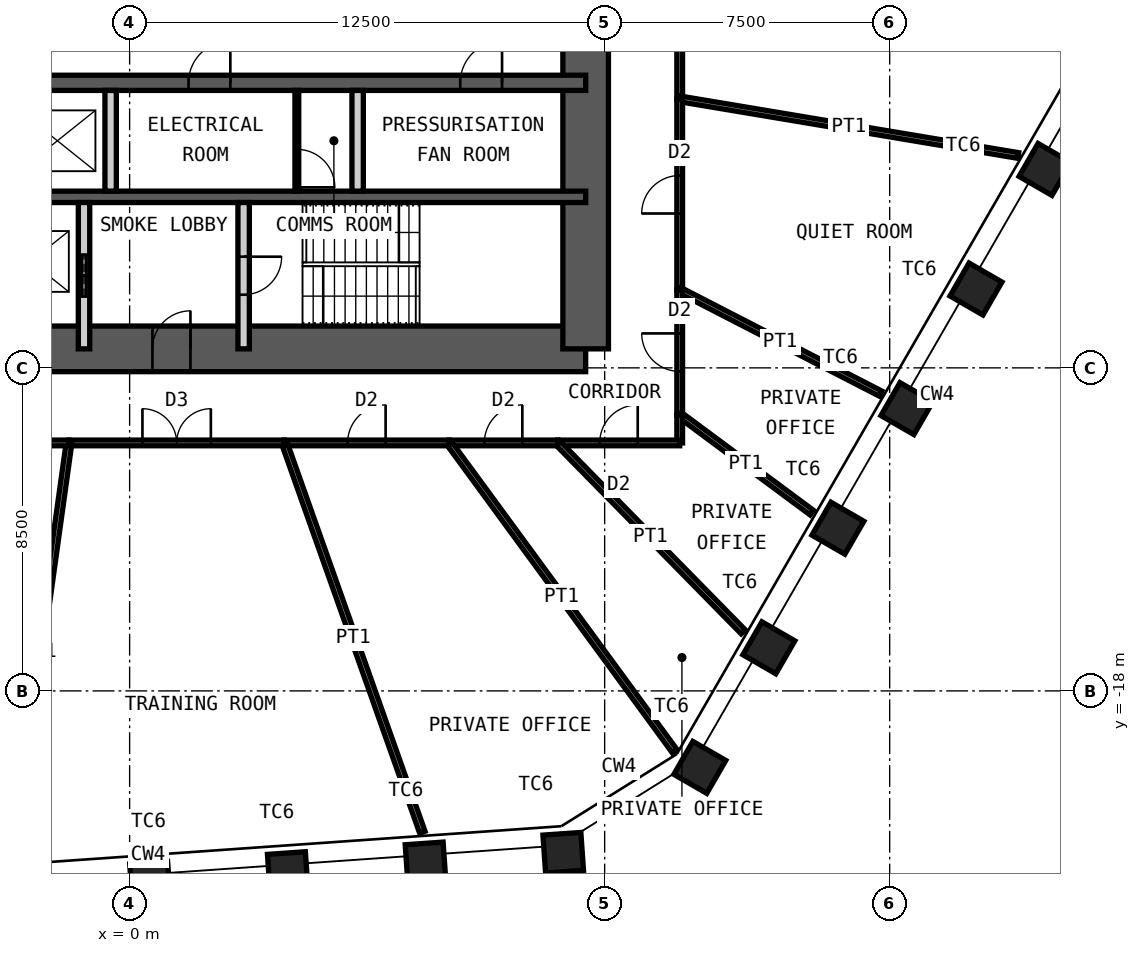
"""IFC4 building model, lengths in metres.
Left out: names, types, materials, properties, quantities, classifications, styles, units other than length and angle.
Written with IfcOpenShell. Run it as: python <this file> out.ifc"""

import sys

from ifc_helpers import new_model, si_unit, direction, frame, frame_2d, origin, origin_2d, place, context, subcontext, project, spatial, rectangle, hollow_rectangle, extrude, element, fill, save


model = new_model("IFC4")
c1 = context("Model", 3, precision=1e-05, world=origin(), true_north=direction((0.0, 1.0)))
c2 = subcontext(c1, "Body", "Model", "MODEL_VIEW")
j1 = project(units=[si_unit("LENGTHUNIT", "METRE"), si_unit("PLANEANGLEUNIT", "RADIAN")], contexts=[c1])
p1 = place(None, origin())
s1 = spatial("IfcSite", under=j1, at=p1, CompositionType="ELEMENT")
p2 = place(p1, origin())
s2 = spatial("IfcBuilding", under=s1, at=p2, CompositionType="ELEMENT")
p3 = place(p2, frame((0.0, 0.0, 235.0)))
s3 = spatial("IfcBuildingStorey", under=s2, at=p3, CompositionType="ELEMENT", Elevation=235.0)
for number, where, z_axis, x_axis in (
    (1, (24.088, -4.279, 0.0), (0.0, 0.0, 1.0), (0.5, 0.866, 0.0)),
    (2, (22.271, -7.426, 0.0), (0.0, 0.0, 1.0), (0.5, 0.866, 0.0)),
    (3, (20.454, -10.572, 0.0), (0.0, 0.0, 1.0), (0.5, 0.866, 0.0)),
    (4, (18.637, -13.719, 0.0), (0.0, 0.0, 1.0), (0.5, 0.866, 0.0)),
    (5, (16.821, -16.866, 0.0), (0.0, 0.0, 1.0), (0.5, 0.866, 0.0)),
    (6, (15.004, -20.012, 0.0), (0.0, 0.0, 1.0), (0.5, 0.866, 0.0)),
    (7, (11.41, -22.258, 0.0), (0.0, 0.0, 1.0), (0.998, 0.07, 0.0)),
    (8, (7.785, -22.512, 0.0), (0.0, 0.0, 1.0), (0.998, 0.07, 0.0)),
    (9, (4.16, -22.765, 0.0), (0.0, 0.0, 1.0), (0.998, 0.07, 0.0)),
    (10, (0.536, -23.019, 0.0), (0.0, 0.0, 1.0), (0.998, 0.07, 0.0)),
):
    element("IfcColumn", number, at=place(p3, frame(where, z_axis=z_axis, x_axis=x_axis)), inside=s3, PredefinedType="COLUMN", context=c2, shape_type="SweptSolid", body=[
        extrude(hollow_rectangle(XDim=1.0, YDim=1.0, WallThickness=0.06, at=origin_2d()), origin(), (0.0, 0.0, 1.0), 4.2),
    ])
p4 = place(p3, frame((-12.0, -9.0, 0.0), z_axis=(0.0, 0.0, 1.0), x_axis=(1.0, 0.0, 0.0)))
e11 = element("IfcWall", 11, at=p4, inside=s3, PredefinedType="SHEAR", context=c2, shape_type="SweptSolid", body=[
    extrude(rectangle(XDim=24.0, YDim=1.2, at=frame_2d((12.0, 0.0))), origin(), (0.0, 0.0, 1.0), 4.2),
])
p5 = place(p4, frame((1.35, 0.0, 0.0)))
e12 = element("IfcOpeningElement", 12, at=p5, cuts=e11, PredefinedType="OPENING", context=c2, shape_type="SweptSolid", body=[
    extrude(rectangle(XDim=1.0, YDim=2.1, at=frame_2d((0.5, 1.05))), frame((0.0, 0.61, 0.0), z_axis=(0.0, -1.0, 0.0), x_axis=(1.0, 0.0, 0.0)), (0.0, 0.0, 1.0), 1.22),
])
p6 = place(p4, frame((5.325, 0.0, 0.0)))
e13 = element("IfcOpeningElement", 13, at=p6, cuts=e11, PredefinedType="OPENING", context=c2, shape_type="SweptSolid", body=[
    extrude(rectangle(XDim=1.15, YDim=2.1, at=frame_2d((0.575, 1.05))), frame((0.0, 0.61, 0.0), z_axis=(0.0, -1.0, 0.0), x_axis=(1.0, 0.0, 0.0)), (0.0, 0.0, 1.0), 1.22),
])
p7 = place(p4, frame((12.6, 0.0, 0.0)))
e14 = element("IfcOpeningElement", 14, at=p7, cuts=e11, PredefinedType="OPENING", context=c2, shape_type="SweptSolid", body=[
    extrude(rectangle(XDim=1.0, YDim=2.1, at=frame_2d((0.5, 1.05))), frame((0.0, 0.61, 0.0), z_axis=(0.0, -1.0, 0.0), x_axis=(1.0, 0.0, 0.0)), (0.0, 0.0, 1.0), 1.22),
])
p8 = place(p3, frame((12.0, -9.0, 0.0), z_axis=(0.0, 0.0, 1.0), x_axis=(0.0, 1.0, 0.0)))
e15 = element("IfcWall", 15, at=p8, inside=s3, PredefinedType="SHEAR", context=c2, shape_type="SweptSolid", body=[
    extrude(rectangle(XDim=18.0, YDim=1.2, at=frame_2d((9.0, 0.0))), origin(), (0.0, 0.0, 1.0), 4.2),
])
p9 = place(p8, frame((8.1, 0.0, 0.0)))
e16 = element("IfcOpeningElement", 16, at=p9, cuts=e15, PredefinedType="OPENING", context=c2, shape_type="SweptSolid", body=[
    extrude(rectangle(XDim=1.8, YDim=2.1, at=frame_2d((0.9, 1.05))), frame((0.0, 0.61, 0.0), z_axis=(0.0, -1.0, 0.0), x_axis=(1.0, 0.0, 0.0)), (0.0, 0.0, 1.0), 1.22),
])
p10 = place(p3, frame((-12.0, -2.0, 0.0), z_axis=(0.0, 0.0, 1.0), x_axis=(1.0, 0.0, 0.0)))
e17 = element("IfcWall", 17, at=p10, inside=s3, PredefinedType="SHEAR", context=c2, shape_type="SweptSolid", body=[
    extrude(rectangle(XDim=24.0, YDim=0.4, at=frame_2d((12.0, 0.0))), origin(), (0.0, 0.0, 1.0), 4.2),
])
p11 = place(p10, frame((1.1, 0.0, 0.0)))
e18 = element("IfcOpeningElement", 18, at=p11, cuts=e17, PredefinedType="OPENING", context=c2, shape_type="SweptSolid", body=[
    extrude(rectangle(XDim=1.1, YDim=2.1, at=frame_2d((0.55, 1.05))), frame((0.0, 0.21, 0.0), z_axis=(0.0, -1.0, 0.0), x_axis=(1.0, 0.0, 0.0)), (0.0, 0.0, 1.0), 0.42),
])
p12 = place(p10, frame((13.55, 0.0, 0.0)))
e19 = element("IfcOpeningElement", 19, at=p12, cuts=e17, PredefinedType="OPENING", context=c2, shape_type="SweptSolid", body=[
    extrude(rectangle(XDim=1.1, YDim=2.1, at=frame_2d((0.55, 1.05))), frame((0.0, 0.21, 0.0), z_axis=(0.0, -1.0, 0.0), x_axis=(1.0, 0.0, 0.0)), (0.0, 0.0, 1.0), 0.42),
])
p13 = place(p10, frame((20.7, 0.0, 0.0)))
e20 = element("IfcOpeningElement", 20, at=p13, cuts=e17, PredefinedType="OPENING", context=c2, shape_type="SweptSolid", body=[
    extrude(rectangle(XDim=1.1, YDim=2.1, at=frame_2d((0.55, 1.05))), frame((0.0, 0.21, 0.0), z_axis=(0.0, -1.0, 0.0), x_axis=(1.0, 0.0, 0.0)), (0.0, 0.0, 1.0), 0.42),
])
p14 = place(p10, frame((4.0, 0.0, 0.0)))
e21 = element("IfcOpeningElement", 21, at=p14, cuts=e17, PredefinedType="OPENING", context=c2, shape_type="SweptSolid", body=[
    extrude(rectangle(XDim=1.0, YDim=2.1, at=frame_2d((0.5, 1.05))), frame((0.0, 0.21, 0.0), z_axis=(0.0, -1.0, 0.0), x_axis=(1.0, 0.0, 0.0)), (0.0, 0.0, 1.0), 0.42),
])
p15 = place(p10, frame((6.8, 0.0, 0.0)))
e22 = element("IfcOpeningElement", 22, at=p15, cuts=e17, PredefinedType="OPENING", context=c2, shape_type="SweptSolid", body=[
    extrude(rectangle(XDim=1.0, YDim=2.1, at=frame_2d((0.5, 1.05))), frame((0.0, 0.21, 0.0), z_axis=(0.0, -1.0, 0.0), x_axis=(1.0, 0.0, 0.0)), (0.0, 0.0, 1.0), 0.42),
])
p16 = place(p3, frame((-12.0, -5.0, 0.0), z_axis=(0.0, 0.0, 1.0), x_axis=(1.0, 0.0, 0.0)))
e23 = element("IfcWall", 23, at=p16, inside=s3, PredefinedType="SHEAR", context=c2, shape_type="SweptSolid", body=[
    extrude(rectangle(XDim=24.0, YDim=0.3, at=frame_2d((12.0, 0.0))), origin(), (0.0, 0.0, 1.0), 4.2),
])
for number, where, z_axis, x_axis in (
    (24, (-0.5, -4.85, 0.0), (0.0, 0.0, 1.0), (0.0, 1.0, 0.0)),
    (25, (6.0, -4.85, 0.0), (0.0, 0.0, 1.0), (0.0, 1.0, 0.0)),
):
    element("IfcWall", number, at=place(p3, frame(where, z_axis=z_axis, x_axis=x_axis)), inside=s3, PredefinedType="PARTITIONING", context=c2, shape_type="SweptSolid", body=[
        extrude(rectangle(XDim=2.65, YDim=0.3, at=frame_2d((1.325, 0.0))), origin(), (0.0, 0.0, 1.0), 3.98),
    ])
p17 = place(p3, frame((-1.2, -9.0, 0.0), z_axis=(0.0, 0.0, 1.0), x_axis=(0.0, 1.0, 0.0)))
e26 = element("IfcWall", 26, at=p17, inside=s3, PredefinedType="PARTITIONING", context=c2, shape_type="SweptSolid", body=[
    extrude(rectangle(XDim=3.85, YDim=0.3, at=frame_2d((1.925, 0.0))), origin(), (0.0, 0.0, 1.0), 3.98),
])
p18 = place(p17, frame((1.375, 0.0, 0.0)))
e27 = element("IfcOpeningElement", 27, at=p18, cuts=e26, PredefinedType="OPENING", context=c2, shape_type="SweptSolid", body=[
    extrude(rectangle(XDim=1.1, YDim=2.4, at=frame_2d((0.55, 1.2))), frame((0.0, 0.16, 0.0), z_axis=(0.0, -1.0, 0.0), x_axis=(1.0, 0.0, 0.0)), (0.0, 0.0, 1.0), 0.32),
])
p19 = place(p3, frame((3.0, -9.0, 0.0), z_axis=(0.0, 0.0, 1.0), x_axis=(0.0, 1.0, 0.0)))
e28 = element("IfcWall", 28, at=p19, inside=s3, PredefinedType="PARTITIONING", context=c2, shape_type="SweptSolid", body=[
    extrude(rectangle(XDim=3.85, YDim=0.3, at=frame_2d((1.925, 0.0))), origin(), (0.0, 0.0, 1.0), 3.98),
])
p20 = place(p19, frame((1.425, 0.0, 0.0)))
e29 = element("IfcOpeningElement", 29, at=p20, cuts=e28, PredefinedType="OPENING", context=c2, shape_type="SweptSolid", body=[
    extrude(rectangle(XDim=1.0, YDim=2.1, at=frame_2d((0.5, 1.05))), frame((0.0, 0.16, 0.0), z_axis=(0.0, -1.0, 0.0), x_axis=(1.0, 0.0, 0.0)), (0.0, 0.0, 1.0), 0.32),
])
p21 = place(p3, frame((4.4, -4.85, 0.0), z_axis=(0.0, 0.0, 1.0), x_axis=(0.0, 1.0, 0.0)))
e30 = element("IfcWall", 30, at=p21, inside=s3, PredefinedType="PARTITIONING", context=c2, shape_type="SweptSolid", body=[
    extrude(rectangle(XDim=2.65, YDim=0.1, at=frame_2d((1.325, 0.0))), origin(), (0.0, 0.0, 1.0), 3.98),
])
p22 = place(p21, frame((0.1, 0.0, 0.0)))
e31 = element("IfcOpeningElement", 31, at=p22, cuts=e30, PredefinedType="OPENING", context=c2, shape_type="SweptSolid", body=[
    extrude(rectangle(XDim=1.0, YDim=2.4, at=frame_2d((0.5, 1.2))), frame((0.0, 0.06, 0.0), z_axis=(0.0, -1.0, 0.0), x_axis=(1.0, 0.0, 0.0)), (0.0, 0.0, 1.0), 0.12),
])
p23 = place(p3, frame((14.475, 3.475, 0.0), z_axis=(0.0, 0.0, 1.0), x_axis=(0.0, -1.0, 0.0)))
e32 = element("IfcWall", 32, at=p23, inside=s3, PredefinedType="PARTITIONING", context=c2, shape_type="SweptSolid", body=[
    extrude(rectangle(XDim=5.896, YDim=0.15, at=frame_2d((2.948, 0.0))), origin(), (0.0, 0.0, 1.0), 4.03),
])
p24 = place(p23, frame((2.448, 0.0, 0.0)))
e33 = element("IfcOpeningElement", 33, at=p24, cuts=e32, PredefinedType="OPENING", context=c2, shape_type="SweptSolid", body=[
    extrude(rectangle(XDim=1.0, YDim=2.4, at=frame_2d((0.5, 1.2))), frame((0.0, 0.085, 0.0), z_axis=(0.0, -1.0, 0.0), x_axis=(1.0, 0.0, 0.0)), (0.0, 0.0, 1.0), 0.17),
])
p25 = place(p3, frame((23.383, -3.912, 0.0), z_axis=(0.0, 0.0, 1.0), x_axis=(-0.986293651891, 0.164999491631, 0.0)))
e34 = element("IfcWall", 34, at=p25, inside=s3, PredefinedType="PARTITIONING", context=c2, shape_type="SweptSolid", body=[
    extrude(rectangle(XDim=9.032, YDim=0.15, at=frame_2d((4.516, 0.0))), origin(), (0.0, 0.0, 1.0), 3.43),
])
p26 = place(p3, frame((14.475, -2.422, 0.0), z_axis=(0.0, 0.0, 1.0), x_axis=(0.0, -1.0, 0.0)))
e35 = element("IfcWall", 35, at=p26, inside=s3, PredefinedType="PARTITIONING", context=c2, shape_type="SweptSolid", body=[
    extrude(rectangle(XDim=5.033, YDim=0.15, at=frame_2d((2.517, 0.0))), origin(), (0.0, 0.0, 1.0), 4.03),
])
p27 = place(p26, frame((2.017, 0.0, 0.0)))
e36 = element("IfcOpeningElement", 36, at=p27, cuts=e35, PredefinedType="OPENING", context=c2, shape_type="SweptSolid", body=[
    extrude(rectangle(XDim=1.0, YDim=2.4, at=frame_2d((0.5, 1.2))), frame((0.0, 0.085, 0.0), z_axis=(0.0, -1.0, 0.0), x_axis=(1.0, 0.0, 0.0)), (0.0, 0.0, 1.0), 0.17),
])
p28 = place(p3, frame((19.759, -10.177, 0.0), z_axis=(0.0, 0.0, 1.0), x_axis=(-0.889015092721, 0.457877893017, 0.0)))
e37 = element("IfcWall", 37, at=p28, inside=s3, PredefinedType="PARTITIONING", context=c2, shape_type="SweptSolid", body=[
    extrude(rectangle(XDim=5.944, YDim=0.15, at=frame_2d((2.972, 0.0))), origin(), (0.0, 0.0, 1.0), 3.43),
])
p29 = place(p3, frame((14.475, -7.455, 0.0), z_axis=(0.0, 0.0, 1.0), x_axis=(0.0, -1.0, 0.0)))
e38 = element("IfcWall", 38, at=p29, inside=s3, PredefinedType="PARTITIONING", context=c2, shape_type="SweptSolid", body=[
    extrude(rectangle(XDim=3.277, YDim=0.15, at=frame_2d((1.639, 0.0))), origin(), (0.0, 0.0, 1.0), 4.03),
])
p30 = place(p29, frame((1.139, 0.0, 0.0)))
e39 = element("IfcOpeningElement", 39, at=p30, cuts=e38, PredefinedType="OPENING", context=c2, shape_type="SweptSolid", body=[
    extrude(rectangle(XDim=1.0, YDim=2.4, at=frame_2d((0.5, 1.2))), frame((0.0, 0.085, 0.0), z_axis=(0.0, -1.0, 0.0), x_axis=(1.0, 0.0, 0.0)), (0.0, 0.0, 1.0), 0.17),
])
p31 = place(p3, frame((17.951, -13.309, 0.0), z_axis=(0.0, 0.0, 1.0), x_axis=(-0.803285242674, 0.595594508791, 0.0)))
e40 = element("IfcWall", 40, at=p31, inside=s3, PredefinedType="PARTITIONING", context=c2, shape_type="SweptSolid", body=[
    extrude(rectangle(XDim=4.327, YDim=0.15, at=frame_2d((2.164, 0.0))), origin(), (0.0, 0.0, 1.0), 3.43),
])
p32 = place(p3, frame((14.475, -10.732, 0.0), z_axis=(0.0, 0.0, 1.0), x_axis=(0.0, -1.0, 0.0)))
e41 = element("IfcWall", 41, at=p32, inside=s3, PredefinedType="PARTITIONING", context=c2, shape_type="SweptSolid", body=[
    extrude(rectangle(XDim=0.743, YDim=0.15, at=frame_2d((0.372, 0.0))), origin(), (0.0, 0.0, 1.0), 4.03),
])
p33 = place(p3, frame((14.475, -11.475, 0.0), z_axis=(0.0, 0.0, 1.0), x_axis=(-1.0, 0.0, 0.0)))
e42 = element("IfcWall", 42, at=p33, inside=s3, PredefinedType="PARTITIONING", context=c2, shape_type="SweptSolid", body=[
    extrude(rectangle(XDim=3.209, YDim=0.15, at=frame_2d((1.605, 0.0))), origin(), (0.0, 0.0, 1.0), 4.03),
])
p34 = place(p33, frame((1.105, 0.0, 0.0)))
e43 = element("IfcOpeningElement", 43, at=p34, cuts=e42, PredefinedType="OPENING", context=c2, shape_type="SweptSolid", body=[
    extrude(rectangle(XDim=1.0, YDim=2.4, at=frame_2d((0.5, 1.2))), frame((0.0, 0.085, 0.0), z_axis=(0.0, -1.0, 0.0), x_axis=(1.0, 0.0, 0.0)), (0.0, 0.0, 1.0), 0.17),
])
p35 = place(p3, frame((16.145, -16.444, 0.0), z_axis=(0.0, 0.0, 1.0), x_axis=(-0.700591378209, 0.71356269576, 0.0)))
e44 = element("IfcWall", 44, at=p35, inside=s3, PredefinedType="PARTITIONING", context=c2, shape_type="SweptSolid", body=[
    extrude(rectangle(XDim=6.964, YDim=0.15, at=frame_2d((3.482, 0.0))), origin(), (0.0, 0.0, 1.0), 3.43),
])
p36 = place(p3, frame((11.266, -11.475, 0.0), z_axis=(0.0, 0.0, 1.0), x_axis=(-1.0, 0.0, 0.0)))
e45 = element("IfcWall", 45, at=p36, inside=s3, PredefinedType="PARTITIONING", context=c2, shape_type="SweptSolid", body=[
    extrude(rectangle(XDim=2.863, YDim=0.15, at=frame_2d((1.432, 0.0))), origin(), (0.0, 0.0, 1.0), 4.03),
])
p37 = place(p36, frame((0.932, 0.0, 0.0)))
e46 = element("IfcOpeningElement", 46, at=p37, cuts=e45, PredefinedType="OPENING", context=c2, shape_type="SweptSolid", body=[
    extrude(rectangle(XDim=1.0, YDim=2.4, at=frame_2d((0.5, 1.2))), frame((0.0, 0.085, 0.0), z_axis=(0.0, -1.0, 0.0), x_axis=(1.0, 0.0, 0.0)), (0.0, 0.0, 1.0), 0.17),
])
p38 = place(p3, frame((14.339, -19.582, 0.0), z_axis=(0.0, 0.0, 1.0), x_axis=(-0.590789413226, 0.806825798559, 0.0)))
e47 = element("IfcWall", 47, at=p38, inside=s3, PredefinedType="PARTITIONING", context=c2, shape_type="SweptSolid", body=[
    extrude(rectangle(XDim=10.048, YDim=0.15, at=frame_2d((5.024, 0.0))), origin(), (0.0, 0.0, 1.0), 2.93),
])
p39 = place(p3, frame((8.403, -11.475, 0.0), z_axis=(0.0, 0.0, 1.0), x_axis=(-1.0, 0.0, 0.0)))
e48 = element("IfcWall", 48, at=p39, inside=s3, PredefinedType="PARTITIONING", context=c2, shape_type="SweptSolid", body=[
    extrude(rectangle(XDim=4.333, YDim=0.15, at=frame_2d((2.167, 0.0))), origin(), (0.0, 0.0, 1.0), 4.03),
])
p40 = place(p39, frame((1.667, 0.0, 0.0)))
e49 = element("IfcOpeningElement", 49, at=p40, cuts=e48, PredefinedType="OPENING", context=c2, shape_type="SweptSolid", body=[
    extrude(rectangle(XDim=1.0, YDim=2.4, at=frame_2d((0.5, 1.2))), frame((0.0, 0.085, 0.0), z_axis=(0.0, -1.0, 0.0), x_axis=(1.0, 0.0, 0.0)), (0.0, 0.0, 1.0), 0.17),
])
p41 = place(p3, frame((7.703, -21.719, 0.0), z_axis=(0.0, 0.0, 1.0), x_axis=(-0.334269551553, 0.942477515331, 0.0)))
e50 = element("IfcWall", 50, at=p41, inside=s3, PredefinedType="PARTITIONING", context=c2, shape_type="SweptSolid", body=[
    extrude(rectangle(XDim=10.869, YDim=0.15, at=frame_2d((5.435, 0.0))), origin(), (0.0, 0.0, 1.0), 3.43),
])
p42 = place(p3, frame((4.07, -11.475, 0.0), z_axis=(0.0, 0.0, 1.0), x_axis=(-1.0, 0.0, 0.0)))
e51 = element("IfcWall", 51, at=p42, inside=s3, PredefinedType="PARTITIONING", context=c2, shape_type="SweptSolid", body=[
    extrude(rectangle(XDim=5.665, YDim=0.15, at=frame_2d((2.832, 0.0))), origin(), (0.0, 0.0, 1.0), 4.03),
])
p43 = place(p42, frame((1.932, 0.0, 0.0)))
e52 = element("IfcOpeningElement", 52, at=p43, cuts=e51, PredefinedType="OPENING", context=c2, shape_type="SweptSolid", body=[
    extrude(rectangle(XDim=1.8, YDim=2.4, at=frame_2d((0.9, 1.2))), frame((0.0, 0.085, 0.0), z_axis=(0.0, -1.0, 0.0), x_axis=(1.0, 0.0, 0.0)), (0.0, 0.0, 1.0), 0.17),
])
p44 = place(p3, frame((-3.124, -22.475, 0.0), z_axis=(0.0, 0.0, 1.0), x_axis=(0.137683997015, 0.990476207168, 0.0)))
e53 = element("IfcWall", 53, at=p44, inside=s3, PredefinedType="PARTITIONING", context=c2, shape_type="SweptSolid", body=[
    extrude(rectangle(XDim=11.105, YDim=0.15, at=frame_2d((5.553, 0.0))), origin(), (0.0, 0.0, 1.0), 3.43),
])
p45 = place(p3, frame((-1.595, -11.475, 0.0), z_axis=(0.0, 0.0, 1.0), x_axis=(-1.0, 0.0, 0.0)))
e54 = element("IfcWall", 54, at=p45, inside=s3, PredefinedType="PARTITIONING", context=c2, shape_type="SweptSolid", body=[
    extrude(rectangle(XDim=7.864, YDim=0.15, at=frame_2d((3.932, 0.0))), origin(), (0.0, 0.0, 1.0), 4.03),
])
p46 = place(p45, frame((3.032, 0.0, 0.0)))
e55 = element("IfcOpeningElement", 55, at=p46, cuts=e54, PredefinedType="OPENING", context=c2, shape_type="SweptSolid", body=[
    extrude(rectangle(XDim=1.8, YDim=2.4, at=frame_2d((0.9, 1.2))), frame((0.0, 0.085, 0.0), z_axis=(0.0, -1.0, 0.0), x_axis=(1.0, 0.0, 0.0)), (0.0, 0.0, 1.0), 0.17),
])
p47 = place(p7, origin())
e56 = element("IfcDoor", 56, at=p47, inside=s3, OperationType="SINGLE_SWING_LEFT", PredefinedType="DOOR", context=c2, shape_type="SweptSolid", body=[
    extrude(rectangle(XDim=1.0, YDim=2.1, at=frame_2d((0.5, 1.05))), frame((0.0, 0.025, 0.0), z_axis=(0.0, -1.0, 0.0), x_axis=(1.0, 0.0, 0.0)), (0.0, 0.0, 1.0), 0.05),
])
fill(e14, e56)
p48 = place(p20, origin())
e57 = element("IfcDoor", 57, at=p48, inside=s3, OperationType="SINGLE_SWING_RIGHT", PredefinedType="DOOR", context=c2, shape_type="SweptSolid", body=[
    extrude(rectangle(XDim=1.0, YDim=2.1, at=frame_2d((0.5, 1.05))), frame((0.0, 0.025, 0.0), z_axis=(0.0, -1.0, 0.0), x_axis=(1.0, 0.0, 0.0)), (0.0, 0.0, 1.0), 0.05),
])
fill(e29, e57)
p49 = place(p12, origin())
e58 = element("IfcDoor", 58, at=p49, inside=s3, OperationType="SINGLE_SWING_LEFT", PredefinedType="DOOR", context=c2, shape_type="SweptSolid", body=[
    extrude(rectangle(XDim=1.1, YDim=2.1, at=frame_2d((0.55, 1.05))), frame((0.0, 0.025, 0.0), z_axis=(0.0, -1.0, 0.0), x_axis=(1.0, 0.0, 0.0)), (0.0, 0.0, 1.0), 0.05),
])
fill(e19, e58)
p50 = place(p13, origin())
e59 = element("IfcDoor", 59, at=p50, inside=s3, OperationType="SINGLE_SWING_LEFT", PredefinedType="DOOR", context=c2, shape_type="SweptSolid", body=[
    extrude(rectangle(XDim=1.1, YDim=2.1, at=frame_2d((0.55, 1.05))), frame((0.0, 0.025, 0.0), z_axis=(0.0, -1.0, 0.0), x_axis=(1.0, 0.0, 0.0)), (0.0, 0.0, 1.0), 0.05),
])
fill(e20, e59)
p51 = place(p18, origin())
e60 = element("IfcDoor", 60, at=p51, inside=s3, OperationType="DOUBLE_DOOR_SLIDING", PredefinedType="DOOR", context=c2, shape_type="SweptSolid", body=[
    extrude(rectangle(XDim=1.1, YDim=2.4, at=frame_2d((0.55, 1.2))), frame((0.0, 0.025, 0.0), z_axis=(0.0, -1.0, 0.0), x_axis=(1.0, 0.0, 0.0)), (0.0, 0.0, 1.0), 0.05),
])
fill(e27, e60)
p52 = place(p22, origin())
e61 = element("IfcDoor", 61, at=p52, inside=s3, OperationType="SINGLE_SWING_LEFT", PredefinedType="DOOR", context=c2, shape_type="SweptSolid", body=[
    extrude(rectangle(XDim=1.0, YDim=2.4, at=frame_2d((0.5, 1.2))), frame((0.0, 0.025, 0.0), z_axis=(0.0, -1.0, 0.0), x_axis=(1.0, 0.0, 0.0)), (0.0, 0.0, 1.0), 0.05),
])
fill(e31, e61)
p53 = place(p27, origin())
e62 = element("IfcDoor", 62, at=p53, inside=s3, OperationType="SINGLE_SWING_RIGHT", PredefinedType="DOOR", context=c2, shape_type="SweptSolid", body=[
    extrude(rectangle(XDim=1.0, YDim=2.4, at=frame_2d((0.5, 1.2))), frame((0.0, 0.025, 0.0), z_axis=(0.0, -1.0, 0.0), x_axis=(1.0, 0.0, 0.0)), (0.0, 0.0, 1.0), 0.05),
])
fill(e36, e62)
p54 = place(p30, origin())
e63 = element("IfcDoor", 63, at=p54, inside=s3, OperationType="SINGLE_SWING_LEFT", PredefinedType="DOOR", context=c2, shape_type="SweptSolid", body=[
    extrude(rectangle(XDim=1.0, YDim=2.4, at=frame_2d((0.5, 1.2))), frame((0.0, 0.025, 0.0), z_axis=(0.0, -1.0, 0.0), x_axis=(1.0, 0.0, 0.0)), (0.0, 0.0, 1.0), 0.05),
])
fill(e39, e63)
p55 = place(p34, origin())
e64 = element("IfcDoor", 64, at=p55, inside=s3, OperationType="SINGLE_SWING_LEFT", PredefinedType="DOOR", context=c2, shape_type="SweptSolid", body=[
    extrude(rectangle(XDim=1.0, YDim=2.4, at=frame_2d((0.5, 1.2))), frame((0.0, 0.025, 0.0), z_axis=(0.0, -1.0, 0.0), x_axis=(1.0, 0.0, 0.0)), (0.0, 0.0, 1.0), 0.05),
])
fill(e43, e64)
p56 = place(p37, origin())
e65 = element("IfcDoor", 65, at=p56, inside=s3, OperationType="SINGLE_SWING_LEFT", PredefinedType="DOOR", context=c2, shape_type="SweptSolid", body=[
    extrude(rectangle(XDim=1.0, YDim=2.4, at=frame_2d((0.5, 1.2))), frame((0.0, 0.025, 0.0), z_axis=(0.0, -1.0, 0.0), x_axis=(1.0, 0.0, 0.0)), (0.0, 0.0, 1.0), 0.05),
])
fill(e46, e65)
p57 = place(p40, origin())
e66 = element("IfcDoor", 66, at=p57, inside=s3, OperationType="SINGLE_SWING_LEFT", PredefinedType="DOOR", context=c2, shape_type="SweptSolid", body=[
    extrude(rectangle(XDim=1.0, YDim=2.4, at=frame_2d((0.5, 1.2))), frame((0.0, 0.025, 0.0), z_axis=(0.0, -1.0, 0.0), x_axis=(1.0, 0.0, 0.0)), (0.0, 0.0, 1.0), 0.05),
])
fill(e49, e66)
p58 = place(p43, origin())
e67 = element("IfcDoor", 67, at=p58, inside=s3, OperationType="DOUBLE_DOOR_DOUBLE_SWING", PredefinedType="DOOR", context=c2, shape_type="SweptSolid", body=[
    extrude(rectangle(XDim=1.8, YDim=2.4, at=frame_2d((0.9, 1.2))), frame((0.0, 0.025, 0.0), z_axis=(0.0, -1.0, 0.0), x_axis=(1.0, 0.0, 0.0)), (0.0, 0.0, 1.0), 0.05),
])
fill(e52, e67)
save(model, sys.argv[1])
